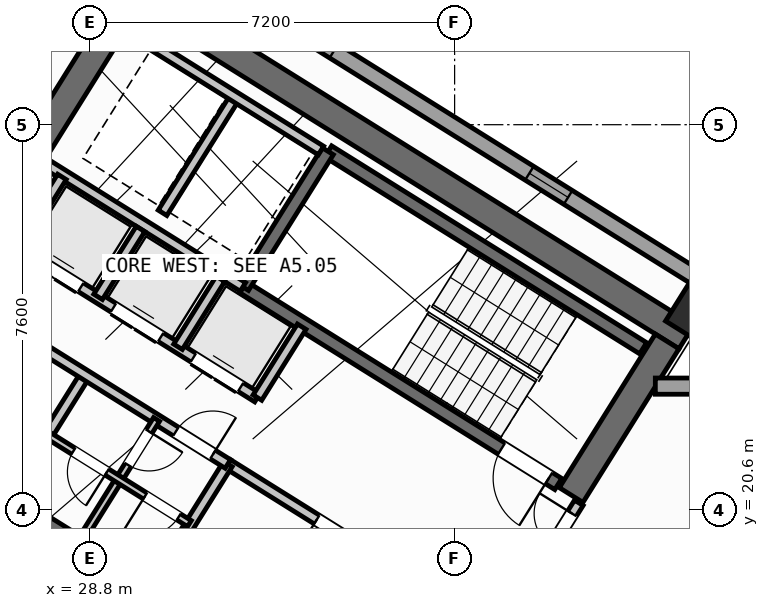
"""IFC4 building model, lengths in metres.
Left out: names, types, materials, properties, quantities, classifications, styles, units other than length and angle.
Written with IfcOpenShell. Run it as: python <this file> out.ifc"""

import sys

from ifc_helpers import new_model, si_unit, direction, frame, frame_2d, origin, origin_2d, place, context, subcontext, project, spatial, rectangle, hollow_rectangle, extrude, source, transform, mapped, element, fill, save


model = new_model("IFC4")
c1 = context("Model", 3, precision=1e-05, world=origin(), true_north=direction((0.0, 1.0)))
c2 = subcontext(c1, "Body", "Model", "MODEL_VIEW")
j1 = project(units=[si_unit("LENGTHUNIT", "METRE"), si_unit("PLANEANGLEUNIT", "RADIAN")], contexts=[c1])
p1 = place(None, origin())
s1 = spatial("IfcSite", under=j1, at=p1, CompositionType="ELEMENT")
p2 = place(p1, origin())
s2 = spatial("IfcBuilding", under=s1, at=p2, CompositionType="ELEMENT")
p3 = place(p2, frame((0.0, 0.0, 151.5)))
s3 = spatial("IfcBuildingStorey", under=s2, at=p3, CompositionType="ELEMENT", Elevation=151.5)
p4 = place(p3, frame((40.573, 24.01, 0.0), z_axis=(0.0, 0.0, 1.0), x_axis=(-0.848047359947, 0.529920442413, 0.0)))
e1 = element("IfcWall", 1, at=p4, inside=s3, PredefinedType="SHEAR", context=c2, shape_type="SweptSolid", body=[
    extrude(rectangle(XDim=13.14, YDim=0.55, at=frame_2d((6.57, 0.0))), origin(), (0.0, 0.0, 1.0), 3.35),
])
p5 = place(p3, frame((40.194, 23.922, 0.0), z_axis=(0.0, 0.0, 1.0), x_axis=(-0.529888438328, -0.848067357541, 0.0)))
e2 = element("IfcWall", 2, at=p5, inside=s3, PredefinedType="SHEAR", context=c2, shape_type="SweptSolid", body=[
    extrude(rectangle(XDim=3.575, YDim=0.55, at=frame_2d((1.788, 0.0))), origin(), (0.0, 0.0, 1.0), 3.35),
])
p6 = place(p3, frame((29.517, 30.594, 0.0), z_axis=(0.0, 0.0, 1.0), x_axis=(-0.529906864564, -0.848055844204, 0.0)))
e3 = element("IfcWall", 3, at=p6, inside=s3, PredefinedType="SHEAR", context=c2, shape_type="SweptSolid", body=[
    extrude(rectangle(XDim=3.575, YDim=0.55, at=frame_2d((1.788, 0.0))), origin(), (0.0, 0.0, 1.0), 3.35),
])
m1 = source(origin(), c2, "Body", "SweptSolid", [
    extrude(hollow_rectangle(XDim=0.9, YDim=0.9, WallThickness=0.036, at=origin_2d()), origin(), (0.0, 0.0, 1.0), 3.6),
])
p7 = place(p3, frame((40.783, 24.469, 0.0), z_axis=(0.0, 0.0, 1.0), x_axis=(-0.848048096156, 0.529919264233, 0.0)))
e4 = element("IfcColumn", 4, at=p7, inside=s3, PredefinedType="COLUMN", context=c2, shape_type="MappedRepresentation", body=[
    mapped(m1, transform((0.0, 0.0, 0.0), scale=1.0)),
])
p8 = place(p3, frame((29.268, 6.429, 0.0), z_axis=(0.0, 0.0, 1.0), x_axis=(-0.848049971435, 0.529916263149, 0.0)))
e5 = element("IfcWall", 5, at=p8, inside=s3, PredefinedType="STANDARD", context=c2, shape_type="SweptSolid", body=[
    extrude(rectangle(XDim=31.588, YDim=0.32, at=frame_2d((15.794, 0.0))), origin(), (0.0, 0.0, 1.0), 3.35),
])
p9 = place(p8, frame((16.362, 0.0, 0.0)))
e6 = element("IfcOpeningElement", 6, at=p9, cuts=e5, PredefinedType="OPENING", context=c2, shape_type="SweptSolid", body=[
    extrude(rectangle(XDim=1.2, YDim=2.15, at=frame_2d((0.6, 1.075))), frame((0.0, 0.17, 0.0), z_axis=(0.0, -1.0, 0.0), x_axis=(1.0, 0.0, 0.0)), (0.0, 0.0, 1.0), 0.34),
])
p10 = place(p8, frame((2.989, 0.0, 0.8)))
e7 = element("IfcOpeningElement", 7, at=p10, cuts=e5, PredefinedType="OPENING", context=c2, shape_type="SweptSolid", body=[
    extrude(rectangle(XDim=2.1, YDim=1.55, at=frame_2d((1.05, 0.775))), frame((0.0, 0.17, 0.0), z_axis=(0.0, -1.0, 0.0), x_axis=(1.0, 0.0, 0.0)), (0.0, 0.0, 1.0), 0.34),
])
p11 = place(p8, frame((8.359, 0.0, 0.8)))
e8 = element("IfcOpeningElement", 8, at=p11, cuts=e5, PredefinedType="OPENING", context=c2, shape_type="SweptSolid", body=[
    extrude(rectangle(XDim=2.1, YDim=1.55, at=frame_2d((1.05, 0.775))), frame((0.0, 0.17, 0.0), z_axis=(0.0, -1.0, 0.0), x_axis=(1.0, 0.0, 0.0)), (0.0, 0.0, 1.0), 0.34),
])
p12 = place(p8, frame((13.284, 0.0, 0.95)))
e9 = element("IfcOpeningElement", 9, at=p12, cuts=e5, PredefinedType="OPENING", context=c2, shape_type="SweptSolid", body=[
    extrude(rectangle(XDim=1.2, YDim=1.4, at=frame_2d((0.6, 0.7))), frame((0.0, 0.17, 0.0), z_axis=(0.0, -1.0, 0.0), x_axis=(1.0, 0.0, 0.0)), (0.0, 0.0, 1.0), 0.34),
])
p13 = place(p8, frame((20.259, 0.0, 0.95)))
e10 = element("IfcOpeningElement", 10, at=p13, cuts=e5, PredefinedType="OPENING", context=c2, shape_type="SweptSolid", body=[
    extrude(rectangle(XDim=1.2, YDim=1.4, at=frame_2d((0.6, 0.7))), frame((0.0, 0.17, 0.0), z_axis=(0.0, -1.0, 0.0), x_axis=(1.0, 0.0, 0.0)), (0.0, 0.0, 1.0), 0.34),
])
p14 = place(p8, frame((22.929, 0.0, 0.95)))
e11 = element("IfcOpeningElement", 11, at=p14, cuts=e5, PredefinedType="OPENING", context=c2, shape_type="SweptSolid", body=[
    extrude(rectangle(XDim=1.2, YDim=1.4, at=frame_2d((0.6, 0.7))), frame((0.0, 0.17, 0.0), z_axis=(0.0, -1.0, 0.0), x_axis=(1.0, 0.0, 0.0)), (0.0, 0.0, 1.0), 0.34),
])
p15 = place(p8, frame((27.481, 0.0, 0.8)))
e12 = element("IfcOpeningElement", 12, at=p15, cuts=e5, PredefinedType="OPENING", context=c2, shape_type="SweptSolid", body=[
    extrude(rectangle(XDim=2.1, YDim=1.55, at=frame_2d((1.05, 0.775))), frame((0.0, 0.17, 0.0), z_axis=(0.0, -1.0, 0.0), x_axis=(1.0, 0.0, 0.0)), (0.0, 0.0, 1.0), 0.34),
])
p16 = place(p3, frame((14.138, 41.825, 0.0), z_axis=(0.0, 0.0, 1.0), x_axis=(0.848046498049, -0.529921821731, 0.0)))
e13 = element("IfcWall", 13, at=p16, inside=s3, PredefinedType="STANDARD", context=c2, shape_type="SweptSolid", body=[
    extrude(rectangle(XDim=31.588, YDim=0.32, at=frame_2d((15.794, 0.0))), origin(), (0.0, 0.0, 1.0), 3.35),
])
p17 = place(p16, frame((9.792, 0.0, 0.0)))
e14 = element("IfcOpeningElement", 14, at=p17, cuts=e13, PredefinedType="OPENING", context=c2, shape_type="SweptSolid", body=[
    extrude(rectangle(XDim=1.05, YDim=2.15, at=frame_2d((0.525, 1.075))), frame((0.0, 0.17, 0.0), z_axis=(0.0, -1.0, 0.0), x_axis=(1.0, 0.0, 0.0)), (0.0, 0.0, 1.0), 0.34),
])
p18 = place(p16, frame((0.791, 0.0, 0.85)))
e15 = element("IfcOpeningElement", 15, at=p18, cuts=e13, PredefinedType="OPENING", context=c2, shape_type="SweptSolid", body=[
    extrude(rectangle(XDim=1.8, YDim=1.5, at=frame_2d((0.9, 0.75))), frame((0.0, 0.17, 0.0), z_axis=(0.0, -1.0, 0.0), x_axis=(1.0, 0.0, 0.0)), (0.0, 0.0, 1.0), 0.34),
])
p19 = place(p16, frame((3.996, 0.0, 0.95)))
e16 = element("IfcOpeningElement", 16, at=p19, cuts=e13, PredefinedType="OPENING", context=c2, shape_type="SweptSolid", body=[
    extrude(rectangle(XDim=1.2, YDim=1.4, at=frame_2d((0.6, 0.7))), frame((0.0, 0.17, 0.0), z_axis=(0.0, -1.0, 0.0), x_axis=(1.0, 0.0, 0.0)), (0.0, 0.0, 1.0), 0.34),
])
p20 = place(p16, frame((13.874, 0.0, 0.85)))
e17 = element("IfcOpeningElement", 17, at=p20, cuts=e13, PredefinedType="OPENING", context=c2, shape_type="SweptSolid", body=[
    extrude(rectangle(XDim=1.5, YDim=1.5, at=frame_2d((0.75, 0.75))), frame((0.0, 0.17, 0.0), z_axis=(0.0, -1.0, 0.0), x_axis=(1.0, 0.0, 0.0)), (0.0, 0.0, 1.0), 0.34),
])
p21 = place(p16, frame((17.104, 0.0, 1.0)))
e18 = element("IfcOpeningElement", 18, at=p21, cuts=e13, PredefinedType="OPENING", context=c2, shape_type="SweptSolid", body=[
    extrude(rectangle(XDim=0.9, YDim=1.25, at=frame_2d((0.45, 0.625))), frame((0.0, 0.17, 0.0), z_axis=(0.0, -1.0, 0.0), x_axis=(1.0, 0.0, 0.0)), (0.0, 0.0, 1.0), 0.34),
])
p22 = place(p16, frame((22.069, 0.0, 1.0)))
e19 = element("IfcOpeningElement", 19, at=p22, cuts=e13, PredefinedType="OPENING", context=c2, shape_type="SweptSolid", body=[
    extrude(rectangle(XDim=0.9, YDim=1.25, at=frame_2d((0.45, 0.625))), frame((0.0, 0.17, 0.0), z_axis=(0.0, -1.0, 0.0), x_axis=(1.0, 0.0, 0.0)), (0.0, 0.0, 1.0), 0.34),
])
p23 = place(p16, frame((27.519, 0.0, 1.0)))
e20 = element("IfcOpeningElement", 20, at=p23, cuts=e13, PredefinedType="OPENING", context=c2, shape_type="SweptSolid", body=[
    extrude(rectangle(XDim=0.9, YDim=1.25, at=frame_2d((0.45, 0.625))), frame((0.0, 0.17, 0.0), z_axis=(0.0, -1.0, 0.0), x_axis=(1.0, 0.0, 0.0)), (0.0, 0.0, 1.0), 0.34),
])
p24 = place(p3, frame((39.961, 23.04, 0.0), z_axis=(0.0, 0.0, 1.0), x_axis=(1.0, 0.0, 0.0)))
e21 = element("IfcWall", 21, at=p24, inside=s3, PredefinedType="STANDARD", context=c2, shape_type="SweptSolid", body=[
    extrude(rectangle(XDim=5.211, YDim=0.32, at=frame_2d((2.605, 0.0))), origin(), (0.0, 0.0, 1.0), 3.35),
])
p25 = place(p3, frame((31.28, 18.261, 0.0), z_axis=(0.0, 0.0, 1.0), x_axis=(-0.848051618787, 0.529913626805, 0.0)))
e22 = element("IfcWall", 22, at=p25, inside=s3, PredefinedType="SHEAR", context=c2, shape_type="SweptSolid", body=[
    extrude(rectangle(XDim=7.46, YDim=0.26, at=frame_2d((3.73, 0.0))), origin(), (0.0, 0.0, 1.0), 3.35),
])
p26 = place(p25, frame((0.36, 0.0, 0.0)))
e23 = element("IfcOpeningElement", 23, at=p26, cuts=e22, PredefinedType="OPENING", context=c2, shape_type="SweptSolid", body=[
    extrude(rectangle(XDim=0.86, YDim=2.05, at=frame_2d((0.43, 1.025))), frame((0.0, 0.14, 0.0), z_axis=(0.0, -1.0, 0.0), x_axis=(1.0, 0.0, 0.0)), (0.0, 0.0, 1.0), 0.28),
])
p27 = place(p3, frame((39.721, 23.788, 0.0), z_axis=(0.0, 0.0, 1.0), x_axis=(-0.848054434086, 0.529909121291, 0.0)))
e24 = element("IfcWall", 24, at=p27, inside=s3, PredefinedType="SHEAR", context=c2, shape_type="SweptSolid", body=[
    extrude(rectangle(XDim=7.33, YDim=0.26, at=frame_2d((3.665, 0.0))), origin(), (0.0, 0.0, 1.0), 3.35),
])
p28 = place(p3, frame((38.046, 21.108, 0.0), z_axis=(0.0, 0.0, 1.0), x_axis=(-0.848054434086, 0.529909121291, 0.0)))
e25 = element("IfcWall", 25, at=p28, inside=s3, PredefinedType="SHEAR", context=c2, shape_type="SweptSolid", body=[
    extrude(rectangle(XDim=7.33, YDim=0.26, at=frame_2d((3.665, 0.0))), origin(), (0.0, 0.0, 1.0), 3.35),
])
p29 = place(p28, frame((0.22, 0.0, 0.0)))
e26 = element("IfcOpeningElement", 26, at=p29, cuts=e25, PredefinedType="OPENING", context=c2, shape_type="SweptSolid", body=[
    extrude(rectangle(XDim=1.1, YDim=2.1, at=frame_2d((0.55, 1.05))), frame((0.0, 0.14, 0.0), z_axis=(0.0, -1.0, 0.0), x_axis=(1.0, 0.0, 0.0)), (0.0, 0.0, 1.0), 0.28),
])
p30 = place(p3, frame((33.496, 27.677, 0.0), z_axis=(0.0, 0.0, 1.0), x_axis=(-0.529908658664, -0.84805472316, 0.0)))
e27 = element("IfcWall", 27, at=p30, inside=s3, PredefinedType="SHEAR", context=c2, shape_type="SweptSolid", body=[
    extrude(rectangle(XDim=3.16, YDim=0.26, at=frame_2d((1.58, 0.0))), origin(), (0.0, 0.0, 1.0), 3.35),
])
p31 = place(p3, frame((36.417, 18.447, 0.0), z_axis=(0.0, 0.0, 1.0), x_axis=(-0.848064879198, 0.529892404805, 0.0)))
e28 = element("IfcWall", 28, at=p31, inside=s3, PredefinedType="STANDARD", context=c2, shape_type="SweptSolid", body=[
    extrude(rectangle(XDim=5.768, YDim=0.2, at=frame_2d((2.884, 0.0))), origin(), (0.0, 0.0, 1.0), 3.34),
])
p32 = place(p31, frame((2.548, 0.0, 0.0)))
e29 = element("IfcOpeningElement", 29, at=p32, cuts=e28, PredefinedType="OPENING", context=c2, shape_type="SweptSolid", body=[
    extrude(rectangle(XDim=1.15, YDim=2.1, at=frame_2d((0.575, 1.05))), frame((0.0, 0.11, 0.0), z_axis=(0.0, -1.0, 0.0), x_axis=(1.0, 0.0, 0.0)), (0.0, 0.0, 1.0), 0.22),
])
p33 = place(p3, frame((31.822, 24.998, 0.0), z_axis=(0.0, 0.0, 1.0), x_axis=(-0.848036912365, 0.52993716162, 0.0)))
e30 = element("IfcWall", 30, at=p33, inside=s3, PredefinedType="STANDARD", context=c2, shape_type="SweptSolid", body=[
    extrude(rectangle(XDim=4.618, YDim=0.2, at=frame_2d((2.309, 0.0))), origin(), (0.0, 0.0, 1.0), 3.34),
])
p34 = place(p3, frame((32.108, 22.814, 0.0), z_axis=(0.0, 0.0, 1.0), x_axis=(-0.848042229521, 0.529928652696, 0.0)))
e31 = element("IfcWall", 31, at=p34, inside=s3, PredefinedType="STANDARD", context=c2, shape_type="SweptSolid", body=[
    extrude(rectangle(XDim=5.62, YDim=0.2, at=frame_2d((2.81, 0.0))), origin(), (0.0, 0.0, 1.0), 3.34),
])
p35 = place(p34, frame((0.39, 0.0, 0.0)))
e32 = element("IfcOpeningElement", 32, at=p35, cuts=e31, PredefinedType="OPENING", context=c2, shape_type="SweptSolid", body=[
    extrude(rectangle(XDim=1.1, YDim=2.15, at=frame_2d((0.55, 1.075))), frame((0.0, 0.11, 0.0), z_axis=(0.0, -1.0, 0.0), x_axis=(1.0, 0.0, 0.0)), (0.0, 0.0, 1.0), 0.22),
])
p36 = place(p34, frame((2.25, 0.0, 0.0)))
e33 = element("IfcOpeningElement", 33, at=p36, cuts=e31, PredefinedType="OPENING", context=c2, shape_type="SweptSolid", body=[
    extrude(rectangle(XDim=1.1, YDim=2.15, at=frame_2d((0.55, 1.075))), frame((0.0, 0.11, 0.0), z_axis=(0.0, -1.0, 0.0), x_axis=(1.0, 0.0, 0.0)), (0.0, 0.0, 1.0), 0.22),
])
p37 = place(p34, frame((4.11, 0.0, 0.0)))
e34 = element("IfcOpeningElement", 34, at=p37, cuts=e31, PredefinedType="OPENING", context=c2, shape_type="SweptSolid", body=[
    extrude(rectangle(XDim=1.1, YDim=2.15, at=frame_2d((0.55, 1.075))), frame((0.0, 0.11, 0.0), z_axis=(0.0, -1.0, 0.0), x_axis=(1.0, 0.0, 0.0)), (0.0, 0.0, 1.0), 0.22),
])
p38 = place(p3, frame((32.982, 24.213, 0.0), z_axis=(0.0, 0.0, 1.0), x_axis=(-0.529839334948, -0.84809803628, 0.0)))
e35 = element("IfcWall", 35, at=p38, inside=s3, PredefinedType="STANDARD", context=c2, shape_type="SweptSolid", body=[
    extrude(rectangle(XDim=1.65, YDim=0.2, at=frame_2d((0.825, 0.0))), origin(), (0.0, 0.0, 1.0), 3.34),
])
p39 = place(p3, frame((28.25, 27.17, 0.0), z_axis=(0.0, 0.0, 1.0), x_axis=(-0.529905827651, -0.848056492117, 0.0)))
e36 = element("IfcWall", 36, at=p39, inside=s3, PredefinedType="STANDARD", context=c2, shape_type="SweptSolid", body=[
    extrude(rectangle(XDim=1.65, YDim=0.2, at=frame_2d((0.825, 0.0))), origin(), (0.0, 0.0, 1.0), 3.34),
])
p40 = place(p3, frame((31.645, 28.716, 0.0), z_axis=(0.0, 0.0, 1.0), x_axis=(-0.52986693015, -0.848080795876, 0.0)))
e37 = element("IfcWall", 37, at=p40, inside=s3, PredefinedType="STANDARD", context=c2, shape_type="SweptSolid", body=[
    extrude(rectangle(XDim=2.66, YDim=0.2, at=frame_2d((1.33, 0.0))), origin(), (0.0, 0.0, 1.0), 3.34),
])
p41 = place(p3, frame((33.363, 27.69, 0.0), z_axis=(0.0, 0.0, 1.0), x_axis=(-0.848047090064, 0.529920874315, 0.0)))
e38 = element("IfcWall", 38, at=p41, inside=s3, PredefinedType="STANDARD", context=c2, shape_type="SweptSolid", body=[
    extrude(rectangle(XDim=4.498, YDim=0.2, at=frame_2d((2.249, 0.0))), origin(), (0.0, 0.0, 1.0), 3.34),
])
for number, where, z_axis, x_axis in (
    (39, (31.379, 25.156, 0.0), (0.0, 0.0, 1.0), (-0.53, -0.848, 0.0)),
    (40, (29.801, 26.142, 0.0), (0.0, 0.0, 1.0), (-0.53, -0.848, 0.0)),
):
    element("IfcWall", number, at=place(p3, frame(where, z_axis=z_axis, x_axis=x_axis)), inside=s3, PredefinedType="STANDARD", context=c2, shape_type="SweptSolid", body=[
        extrude(rectangle(XDim=1.58, YDim=0.2, at=frame_2d((0.79, 0.0))), origin(), (0.0, 0.0, 1.0), 3.34),
    ])
for number, where, z_axis, x_axis in (
    (41, (31.525, 21.504, 0.0), (0.0, 0.0, 1.0), (-0.53, -0.848, 0.0)),
    (42, (28.71, 23.263, 0.0), (0.0, 0.0, 1.0), (-0.53, -0.848, 0.0)),
):
    element("IfcWall", number, at=place(p3, frame(where, z_axis=z_axis, x_axis=x_axis)), inside=s3, PredefinedType="STANDARD", context=c2, shape_type="SweptSolid", body=[
        extrude(rectangle(XDim=2.88, YDim=0.2, at=frame_2d((1.44, 0.0))), origin(), (0.0, 0.0, 1.0), 3.34),
    ])
p42 = place(p3, frame((31.525, 21.504, 0.0), z_axis=(0.0, 0.0, 1.0), x_axis=(-0.848040211232, 0.529931882541, 0.0)))
e43 = element("IfcWall", 43, at=p42, inside=s3, PredefinedType="STANDARD", context=c2, shape_type="SweptSolid", body=[
    extrude(rectangle(XDim=6.218, YDim=0.2, at=frame_2d((3.109, 0.0))), origin(), (0.0, 0.0, 1.0), 3.34),
])
p43 = place(p42, frame((4.4, 0.0, 0.0)))
e44 = element("IfcOpeningElement", 44, at=p43, cuts=e43, PredefinedType="OPENING", context=c2, shape_type="SweptSolid", body=[
    extrude(rectangle(XDim=0.86, YDim=2.05, at=frame_2d((0.43, 1.025))), frame((0.0, 0.11, 0.0), z_axis=(0.0, -1.0, 0.0), x_axis=(1.0, 0.0, 0.0)), (0.0, 0.0, 1.0), 0.22),
])
p44 = place(p42, frame((0.35, 0.0, 0.0)))
e45 = element("IfcOpeningElement", 45, at=p44, cuts=e43, PredefinedType="OPENING", context=c2, shape_type="SweptSolid", body=[
    extrude(rectangle(XDim=0.86, YDim=2.05, at=frame_2d((0.43, 1.025))), frame((0.0, 0.11, 0.0), z_axis=(0.0, -1.0, 0.0), x_axis=(1.0, 0.0, 0.0)), (0.0, 0.0, 1.0), 0.22),
])
p45 = place(p3, frame((30.117, 22.384, 0.0), z_axis=(0.0, 0.0, 1.0), x_axis=(-0.529951914384, -0.848027693204, 0.0)))
e46 = element("IfcWall", 46, at=p45, inside=s3, PredefinedType="PLUMBINGWALL", context=c2, shape_type="SweptSolid", body=[
    extrude(rectangle(XDim=1.4, YDim=0.14, at=frame_2d((0.7, 0.0))), origin(), (0.0, 0.0, 1.0), 3.34),
])
p46 = place(p45, frame((0.28, 0.0, 0.0)))
e47 = element("IfcOpeningElement", 47, at=p46, cuts=e46, PredefinedType="OPENING", context=c2, shape_type="SweptSolid", body=[
    extrude(rectangle(XDim=0.78, YDim=2.05, at=frame_2d((0.39, 1.025))), frame((0.0, 0.08, 0.0), z_axis=(0.0, -1.0, 0.0), x_axis=(1.0, 0.0, 0.0)), (0.0, 0.0, 1.0), 0.16),
])
p47 = place(p3, frame((29.375, 21.196, 0.0), z_axis=(0.0, 0.0, 1.0), x_axis=(-0.529865479138, -0.848081702443, 0.0)))
e48 = element("IfcWall", 48, at=p47, inside=s3, PredefinedType="PLUMBINGWALL", context=c2, shape_type="SweptSolid", body=[
    extrude(rectangle(XDim=1.48, YDim=0.14, at=frame_2d((0.74, 0.0))), origin(), (0.0, 0.0, 1.0), 3.34),
])
p48 = place(p3, frame((30.766, 20.327, 0.0), z_axis=(0.0, 0.0, 1.0), x_axis=(-0.848052663127, 0.529911955482, 0.0)))
e49 = element("IfcWall", 49, at=p48, inside=s3, PredefinedType="PLUMBINGWALL", context=c2, shape_type="SweptSolid", body=[
    extrude(rectangle(XDim=3.28, YDim=0.14, at=frame_2d((1.64, 0.0))), origin(), (0.0, 0.0, 1.0), 3.34),
])
p49 = place(p48, frame((0.25, 0.0, 0.0)))
e50 = element("IfcOpeningElement", 50, at=p49, cuts=e49, PredefinedType="OPENING", context=c2, shape_type="SweptSolid", body=[
    extrude(rectangle(XDim=0.78, YDim=2.05, at=frame_2d((0.39, 1.025))), frame((0.0, 0.08, 0.0), z_axis=(0.0, -1.0, 0.0), x_axis=(1.0, 0.0, 0.0)), (0.0, 0.0, 1.0), 0.16),
])
p50 = place(p48, frame((1.92, 0.0, 0.0)))
e51 = element("IfcOpeningElement", 51, at=p50, cuts=e49, PredefinedType="OPENING", context=c2, shape_type="SweptSolid", body=[
    extrude(rectangle(XDim=0.78, YDim=2.05, at=frame_2d((0.39, 1.025))), frame((0.0, 0.08, 0.0), z_axis=(0.0, -1.0, 0.0), x_axis=(1.0, 0.0, 0.0)), (0.0, 0.0, 1.0), 0.16),
])
p51 = place(p3, frame((38.451, 20.737, 0.0), z_axis=(0.0, 0.0, 1.0), x_axis=(-0.529924799939, -0.848044637038, 0.0)))
e52 = element("IfcWall", 52, at=p51, inside=s3, PredefinedType="STANDARD", context=c2, shape_type="SweptSolid", body=[
    extrude(rectangle(XDim=2.96, YDim=0.2, at=frame_2d((1.48, 0.0))), origin(), (0.0, 0.0, 1.0), 3.34),
])
p52 = place(p51, frame((0.25, 0.0, 0.0)))
e53 = element("IfcOpeningElement", 53, at=p52, cuts=e52, PredefinedType="OPENING", context=c2, shape_type="SweptSolid", body=[
    extrude(rectangle(XDim=1.5, YDim=2.15, at=frame_2d((0.75, 1.075))), frame((0.0, 0.11, 0.0), z_axis=(0.0, -1.0, 0.0), x_axis=(1.0, 0.0, 0.0)), (0.0, 0.0, 1.0), 0.22),
])
m2 = source(origin(), c2, "Body", "SweptSolid", [
    extrude(rectangle(XDim=0.9, YDim=1.25, at=frame_2d((0.45, 0.625))), frame((0.0, 0.03, 0.0), z_axis=(0.0, -1.0, 0.0), x_axis=(1.0, 0.0, 0.0)), (0.0, 0.0, 1.0), 0.06),
])
p53 = place(p22, origin())
e54 = element("IfcWindow", 54, at=p53, inside=s3, PartitioningType="SINGLE_PANEL", PredefinedType="WINDOW", context=c2, shape_type="MappedRepresentation", body=[
    mapped(m2, transform((0.0, 0.0, 0.0), scale=1.0)),
])
fill(e19, e54)
p54 = place(p23, origin())
e55 = element("IfcWindow", 55, at=p54, inside=s3, PartitioningType="SINGLE_PANEL", PredefinedType="WINDOW", context=c2, shape_type="MappedRepresentation", body=[
    mapped(m2, transform((0.0, 0.0, 0.0), scale=1.0)),
])
fill(e20, e55)
m3 = source(origin(), c2, "Body", "SweptSolid", [
    extrude(rectangle(XDim=1.1, YDim=2.1, at=frame_2d((0.55, 1.05))), frame((0.0, 0.025, 0.0), z_axis=(0.0, -1.0, 0.0), x_axis=(1.0, 0.0, 0.0)), (0.0, 0.0, 1.0), 0.05),
])
p55 = place(p29, origin())
e56 = element("IfcDoor", 56, at=p55, inside=s3, OperationType="SINGLE_SWING_LEFT", PredefinedType="DOOR", context=c2, shape_type="MappedRepresentation", body=[
    mapped(m3, transform((0.0, 0.0, 0.0), scale=1.0)),
])
fill(e26, e56)
m4 = source(origin(), c2, "Body", "SweptSolid", [
    extrude(rectangle(XDim=1.15, YDim=2.1, at=frame_2d((0.575, 1.05))), frame((0.0, 0.025, 0.0), z_axis=(0.0, -1.0, 0.0), x_axis=(1.0, 0.0, 0.0)), (0.0, 0.0, 1.0), 0.05),
])
p56 = place(p32, origin())
e57 = element("IfcDoor", 57, at=p56, inside=s3, OperationType="SINGLE_SWING_RIGHT", PredefinedType="DOOR", context=c2, shape_type="MappedRepresentation", body=[
    mapped(m4, transform((0.0, 0.0, 0.0), scale=1.0)),
])
fill(e29, e57)
m5 = source(origin(), c2, "Body", "SweptSolid", [
    extrude(rectangle(XDim=1.1, YDim=2.15, at=frame_2d((0.55, 1.075))), frame((0.0, 0.025, 0.0), z_axis=(0.0, -1.0, 0.0), x_axis=(1.0, 0.0, 0.0)), (0.0, 0.0, 1.0), 0.05),
])
p57 = place(p35, origin())
e58 = element("IfcDoor", 58, at=p57, inside=s3, OperationType="DOUBLE_DOOR_SLIDING", PredefinedType="DOOR", context=c2, shape_type="MappedRepresentation", body=[
    mapped(m5, transform((0.0, 0.0, 0.0), scale=1.0)),
])
fill(e32, e58)
p58 = place(p36, origin())
e59 = element("IfcDoor", 59, at=p58, inside=s3, OperationType="DOUBLE_DOOR_SLIDING", PredefinedType="DOOR", context=c2, shape_type="MappedRepresentation", body=[
    mapped(m5, transform((0.0, 0.0, 0.0), scale=1.0)),
])
fill(e33, e59)
p59 = place(p37, origin())
e60 = element("IfcDoor", 60, at=p59, inside=s3, OperationType="DOUBLE_DOOR_SLIDING", PredefinedType="DOOR", context=c2, shape_type="MappedRepresentation", body=[
    mapped(m5, transform((0.0, 0.0, 0.0), scale=1.0)),
])
fill(e34, e60)
m6 = source(origin(), c2, "Body", "SweptSolid", [
    extrude(rectangle(XDim=0.86, YDim=2.05, at=frame_2d((0.43, 1.025))), frame((0.0, 0.025, 0.0), z_axis=(0.0, -1.0, 0.0), x_axis=(1.0, 0.0, 0.0)), (0.0, 0.0, 1.0), 0.05),
])
p60 = place(p44, frame((0.86, 0.0, 0.0), z_axis=(0.0, 0.0, 1.0), x_axis=(-1.0, 0.0, 0.0)))
e61 = element("IfcDoor", 61, at=p60, inside=s3, OperationType="SINGLE_SWING_RIGHT", PredefinedType="DOOR", context=c2, shape_type="MappedRepresentation", body=[
    mapped(m6, transform((0.0, 0.0, 0.0), scale=1.0)),
])
fill(e45, e61)
m7 = source(origin(), c2, "Body", "SweptSolid", [
    extrude(rectangle(XDim=0.78, YDim=2.05, at=frame_2d((0.39, 1.025))), frame((0.0, 0.025, 0.0), z_axis=(0.0, -1.0, 0.0), x_axis=(1.0, 0.0, 0.0)), (0.0, 0.0, 1.0), 0.05),
])
p61 = place(p46, origin())
e62 = element("IfcDoor", 62, at=p61, inside=s3, OperationType="SINGLE_SWING_LEFT", PredefinedType="DOOR", context=c2, shape_type="MappedRepresentation", body=[
    mapped(m7, transform((0.0, 0.0, 0.0), scale=1.0)),
])
fill(e47, e62)
p62 = place(p49, origin())
e63 = element("IfcDoor", 63, at=p62, inside=s3, OperationType="SINGLE_SWING_RIGHT", PredefinedType="DOOR", context=c2, shape_type="MappedRepresentation", body=[
    mapped(m7, transform((0.0, 0.0, 0.0), scale=1.0)),
])
fill(e50, e63)
p63 = place(p50, origin())
e64 = element("IfcDoor", 64, at=p63, inside=s3, OperationType="SINGLE_SWING_LEFT", PredefinedType="DOOR", context=c2, shape_type="MappedRepresentation", body=[
    mapped(m7, transform((0.0, 0.0, 0.0), scale=1.0)),
])
fill(e51, e64)
m8 = source(origin(), c2, "Body", "SweptSolid", [
    extrude(rectangle(XDim=1.5, YDim=2.15, at=frame_2d((0.75, 1.075))), frame((0.0, 0.025, 0.0), z_axis=(0.0, -1.0, 0.0), x_axis=(1.0, 0.0, 0.0)), (0.0, 0.0, 1.0), 0.05),
])
p64 = place(p52, frame((1.5, 0.0, 0.0), z_axis=(0.0, 0.0, 1.0), x_axis=(-1.0, 0.0, 0.0)))
e65 = element("IfcDoor", 65, at=p64, inside=s3, OperationType="DOUBLE_DOOR_SINGLE_SWING", PredefinedType="DOOR", context=c2, shape_type="MappedRepresentation", body=[
    mapped(m8, transform((0.0, 0.0, 0.0), scale=1.0)),
])
fill(e53, e65)
save(model, sys.argv[1])
